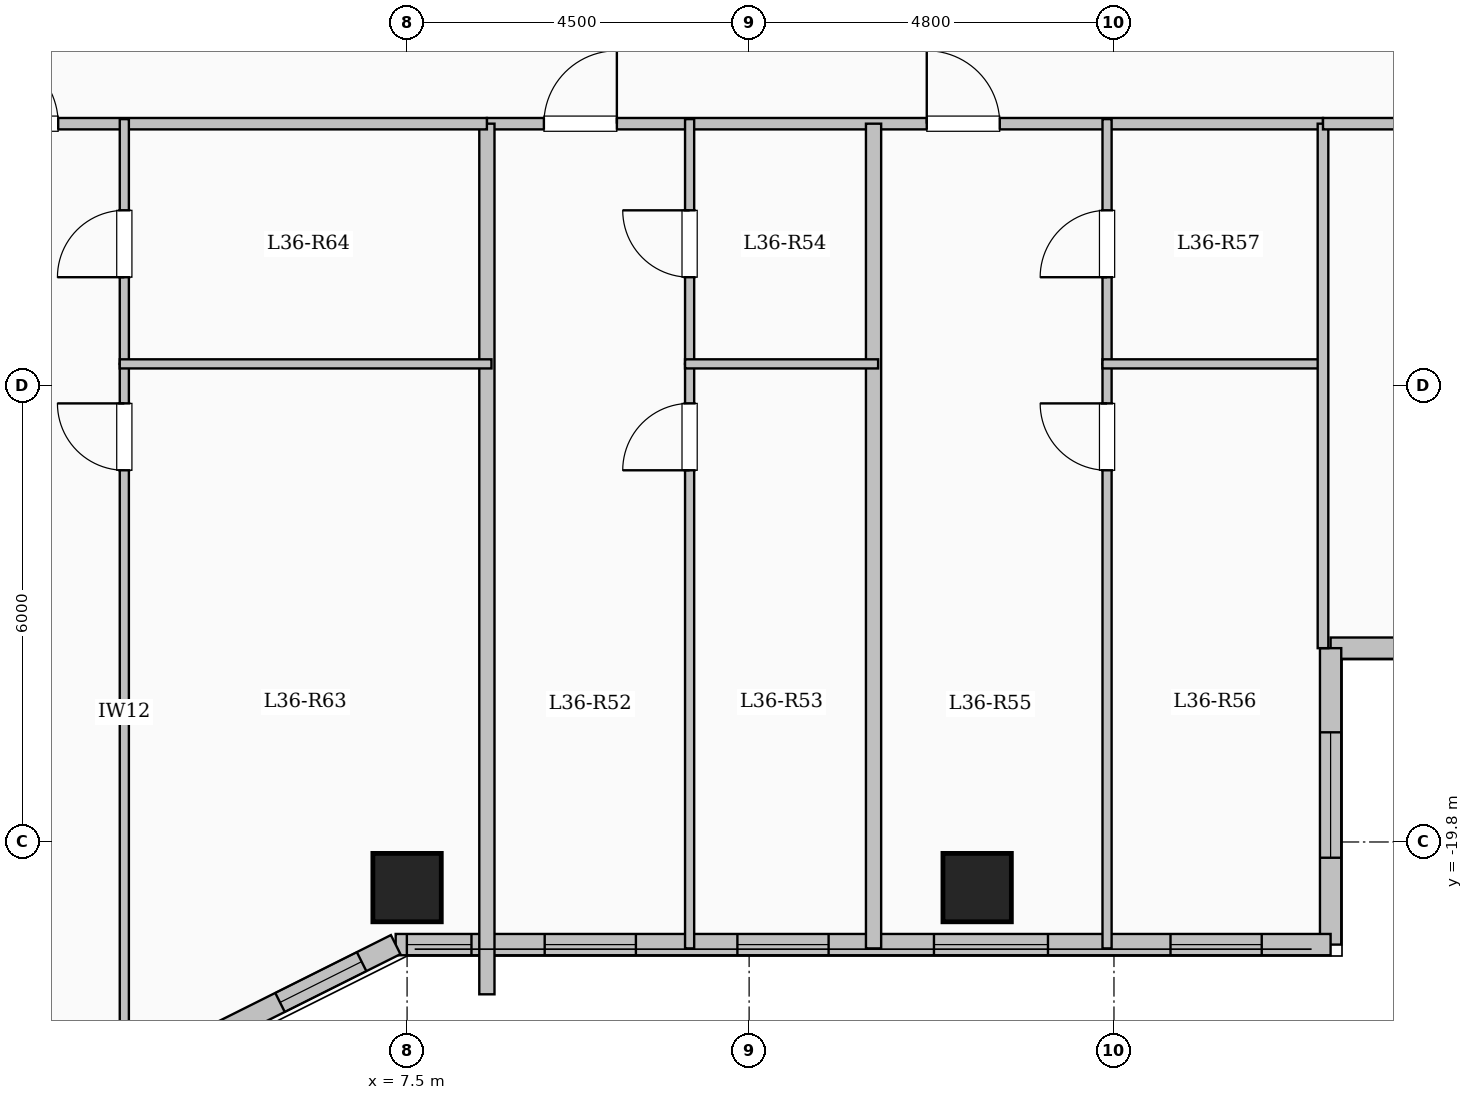
"""IFC4 building model, lengths in metres.
Left out: names, types, materials, properties, quantities, classifications, styles, units other than length and angle.
Written with IfcOpenShell. Run it as: python <this file> out.ifc"""

import sys

from ifc_helpers import new_model, si_unit, direction, frame, frame_2d, origin, origin_2d, place, context, subcontext, project, spatial, rectangle, extrude, element, fill, save


model = new_model("IFC4")
c1 = context("Model", 3, precision=1e-05, world=origin(), true_north=direction((0.0, 1.0)))
c2 = subcontext(c1, "Body", "Model", "MODEL_VIEW")
j1 = project(units=[si_unit("LENGTHUNIT", "METRE"), si_unit("PLANEANGLEUNIT", "RADIAN")], contexts=[c1])
p1 = place(None, origin())
s1 = spatial("IfcSite", under=j1, at=p1, CompositionType="ELEMENT")
p2 = place(p1, origin())
s2 = spatial("IfcBuilding", under=s1, at=p2, CompositionType="ELEMENT")
p3 = place(p2, frame((0.0, 0.0, 135.95)))
s3 = spatial("IfcBuildingStorey", under=s2, at=p3, CompositionType="ELEMENT", Elevation=135.95)
for number, where, z_axis, x_axis in (
    (1, (7.5, -20.4, 0.0), (0.0, 0.0, 1.0), (1.0, 0.0, 0.0)),
    (2, (15.0, -20.4, 0.0), (0.0, 0.0, 1.0), (1.0, 0.0, 0.0)),
):
    element("IfcColumn", number, at=place(p3, frame(where, z_axis=z_axis, x_axis=x_axis)), inside=s3, PredefinedType="COLUMN", context=c2, shape_type="SweptSolid", body=[
        extrude(rectangle(XDim=0.9, YDim=0.9, at=origin_2d()), origin(), (0.0, 0.0, 1.0), 3.35),
    ])
p4 = place(p3, frame((25.05, -17.25, 0.0), z_axis=(0.0, 0.0, 1.0), x_axis=(-1.0, 0.0, 0.0)))
e3 = element("IfcWall", 3, at=p4, inside=s3, PredefinedType="SOLIDWALL", context=c2, shape_type="SweptSolid", body=[
    extrude(rectangle(XDim=5.4, YDim=0.28, at=frame_2d((2.7, 0.0))), origin(), (0.0, 0.0, 1.0), 3.1),
])
p5 = place(p4, frame((1.625, 0.0, 0.9)))
e4 = element("IfcOpeningElement", 4, at=p5, cuts=e3, PredefinedType="OPENING", context=c2, shape_type="SweptSolid", body=[
    extrude(rectangle(XDim=2.2, YDim=1.75, at=frame_2d((1.1, 0.875))), frame((0.0, 0.15, 0.0), z_axis=(0.0, -1.0, 0.0), x_axis=(1.0, 0.0, 0.0)), (0.0, 0.0, 1.0), 0.3),
])
p6 = place(p3, frame((19.65, -17.25, 0.0), z_axis=(0.0, 0.0, 1.0), x_axis=(0.0, -1.0, 0.0)))
e5 = element("IfcWall", 5, at=p6, inside=s3, PredefinedType="SOLIDWALL", context=c2, shape_type="SweptSolid", body=[
    extrude(rectangle(XDim=3.9, YDim=0.28, at=frame_2d((1.95, 0.0))), origin(), (0.0, 0.0, 1.0), 3.1),
])
p7 = place(p6, frame((1.107, 0.0, 0.9)))
e6 = element("IfcOpeningElement", 6, at=p7, cuts=e5, PredefinedType="OPENING", context=c2, shape_type="SweptSolid", body=[
    extrude(rectangle(XDim=1.65, YDim=1.6, at=frame_2d((0.825, 0.8))), frame((0.0, 0.15, 0.0), z_axis=(0.0, -1.0, 0.0), x_axis=(1.0, 0.0, 0.0)), (0.0, 0.0, 1.0), 0.3),
])
p8 = place(p3, frame((19.65, -21.15, 0.0), z_axis=(0.0, 0.0, 1.0), x_axis=(-1.0, 0.0, 0.0)))
e7 = element("IfcWall", 7, at=p8, inside=s3, PredefinedType="SOLIDWALL", context=c2, shape_type="SweptSolid", body=[
    extrude(rectangle(XDim=12.3, YDim=0.28, at=frame_2d((6.15, 0.0))), origin(), (0.0, 0.0, 1.0), 3.1),
])
p9 = place(p8, frame((0.906, 0.0, 0.95)))
e8 = element("IfcOpeningElement", 8, at=p9, cuts=e7, PredefinedType="OPENING", context=c2, shape_type="SweptSolid", body=[
    extrude(rectangle(XDim=1.2, YDim=1.5, at=frame_2d((0.6, 0.75))), frame((0.0, 0.15, 0.0), z_axis=(0.0, -1.0, 0.0), x_axis=(1.0, 0.0, 0.0)), (0.0, 0.0, 1.0), 0.3),
])
p10 = place(p8, frame((3.718, 0.0, 0.9)))
e9 = element("IfcOpeningElement", 9, at=p10, cuts=e7, PredefinedType="OPENING", context=c2, shape_type="SweptSolid", body=[
    extrude(rectangle(XDim=1.5, YDim=1.65, at=frame_2d((0.75, 0.825))), frame((0.0, 0.15, 0.0), z_axis=(0.0, -1.0, 0.0), x_axis=(1.0, 0.0, 0.0)), (0.0, 0.0, 1.0), 0.3),
])
p11 = place(p8, frame((6.604, 0.0, 0.95)))
e10 = element("IfcOpeningElement", 10, at=p11, cuts=e7, PredefinedType="OPENING", context=c2, shape_type="SweptSolid", body=[
    extrude(rectangle(XDim=1.2, YDim=1.5, at=frame_2d((0.6, 0.75))), frame((0.0, 0.15, 0.0), z_axis=(0.0, -1.0, 0.0), x_axis=(1.0, 0.0, 0.0)), (0.0, 0.0, 1.0), 0.3),
])
p12 = place(p8, frame((9.14, 0.0, 0.95)))
e11 = element("IfcOpeningElement", 11, at=p12, cuts=e7, PredefinedType="OPENING", context=c2, shape_type="SweptSolid", body=[
    extrude(rectangle(XDim=1.2, YDim=1.5, at=frame_2d((0.6, 0.75))), frame((0.0, 0.15, 0.0), z_axis=(0.0, -1.0, 0.0), x_axis=(1.0, 0.0, 0.0)), (0.0, 0.0, 1.0), 0.3),
])
p13 = place(p8, frame((11.303, 0.0, 0.95)))
e12 = element("IfcOpeningElement", 12, at=p13, cuts=e7, PredefinedType="OPENING", context=c2, shape_type="SweptSolid", body=[
    extrude(rectangle(XDim=0.85, YDim=1.5, at=frame_2d((0.425, 0.75))), frame((0.0, 0.15, 0.0), z_axis=(0.0, -1.0, 0.0), x_axis=(1.0, 0.0, 0.0)), (0.0, 0.0, 1.0), 0.3),
])
p14 = place(p3, frame((7.35, -21.15, 0.0), z_axis=(0.0, 0.0, 1.0), x_axis=(-0.894427191, -0.4472135955, 0.0)))
e13 = element("IfcWall", 13, at=p14, inside=s3, PredefinedType="SOLIDWALL", context=c2, shape_type="SweptSolid", body=[
    extrude(rectangle(XDim=3.354, YDim=0.28, at=frame_2d((1.677, 0.0))), origin(), (0.0, 0.0, 1.0), 3.1),
])
p15 = place(p14, frame((0.501, 0.0, 0.95)))
e14 = element("IfcOpeningElement", 14, at=p15, cuts=e13, PredefinedType="OPENING", context=c2, shape_type="SweptSolid", body=[
    extrude(rectangle(XDim=1.2, YDim=1.5, at=frame_2d((0.6, 0.75))), frame((0.0, 0.15, 0.0), z_axis=(0.0, -1.0, 0.0), x_axis=(1.0, 0.0, 0.0)), (0.0, 0.0, 1.0), 0.3),
])
p16 = place(p3, frame((8.55, -10.35, 0.0), z_axis=(0.0, 0.0, 1.0), x_axis=(1.0, 0.0, 0.0)))
e15 = element("IfcWall", 15, at=p16, inside=s3, PredefinedType="PARTITIONING", context=c2, shape_type="SweptSolid", body=[
    extrude(rectangle(XDim=11.0, YDim=0.15, at=frame_2d((5.5, 0.0))), origin(), (0.0, 0.0, 1.0), 3.1),
])
p17 = place(p16, frame((0.75, 0.0, 0.0)))
e16 = element("IfcOpeningElement", 16, at=p17, cuts=e15, PredefinedType="OPENING", context=c2, shape_type="SweptSolid", body=[
    extrude(rectangle(XDim=0.96, YDim=2.15, at=frame_2d((0.48, 1.075))), frame((0.0, 0.085, 0.0), z_axis=(0.0, -1.0, 0.0), x_axis=(1.0, 0.0, 0.0)), (0.0, 0.0, 1.0), 0.17),
])
p18 = place(p16, frame((5.787, 0.0, 0.0)))
e17 = element("IfcOpeningElement", 17, at=p18, cuts=e15, PredefinedType="OPENING", context=c2, shape_type="SweptSolid", body=[
    extrude(rectangle(XDim=0.96, YDim=2.15, at=frame_2d((0.48, 1.075))), frame((0.0, 0.085, 0.0), z_axis=(0.0, -1.0, 0.0), x_axis=(1.0, 0.0, 0.0)), (0.0, 0.0, 1.0), 0.17),
])
p19 = place(p3, frame((13.637, -21.2, 0.0), z_axis=(0.0, 0.0, 1.0), x_axis=(0.0, 1.0, 0.0)))
e18 = element("IfcWall", 18, at=p19, inside=s3, PredefinedType="SOLIDWALL", context=c2, shape_type="SweptSolid", body=[
    extrude(rectangle(XDim=10.85, YDim=0.2, at=frame_2d((5.425, 0.0))), origin(), (0.0, 0.0, 1.0), 3.1),
])
p20 = place(p3, frame((11.217, -21.2, 0.0), z_axis=(0.0, 0.0, 1.0), x_axis=(0.0, 1.0, 0.0)))
e19 = element("IfcWall", 19, at=p20, inside=s3, PredefinedType="PARTITIONING", context=c2, shape_type="SweptSolid", body=[
    extrude(rectangle(XDim=7.69, YDim=0.12, at=frame_2d((3.845, 0.0))), origin(), (0.0, 0.0, 1.0), 3.1),
])
p21 = place(p20, frame((6.29, 0.0, 0.0)))
e20 = element("IfcOpeningElement", 20, at=p21, cuts=e19, PredefinedType="OPENING", context=c2, shape_type="SweptSolid", body=[
    extrude(rectangle(XDim=0.88, YDim=2.1, at=frame_2d((0.44, 1.05))), frame((0.0, 0.07, 0.0), z_axis=(0.0, -1.0, 0.0), x_axis=(1.0, 0.0, 0.0)), (0.0, 0.0, 1.0), 0.14),
])
p22 = place(p3, frame((11.217, -13.51, 0.0), z_axis=(0.0, 0.0, 1.0), x_axis=(0.0, 1.0, 0.0)))
e21 = element("IfcWall", 21, at=p22, inside=s3, PredefinedType="PARTITIONING", context=c2, shape_type="SweptSolid", body=[
    extrude(rectangle(XDim=3.22, YDim=0.12, at=frame_2d((1.61, 0.0))), origin(), (0.0, 0.0, 1.0), 3.1),
])
p23 = place(p22, frame((1.14, 0.0, 0.0)))
e22 = element("IfcOpeningElement", 22, at=p23, cuts=e21, PredefinedType="OPENING", context=c2, shape_type="SweptSolid", body=[
    extrude(rectangle(XDim=0.88, YDim=2.1, at=frame_2d((0.44, 1.05))), frame((0.0, 0.07, 0.0), z_axis=(0.0, -1.0, 0.0), x_axis=(1.0, 0.0, 0.0)), (0.0, 0.0, 1.0), 0.14),
])
p24 = place(p3, frame((11.157, -13.51, 0.0), z_axis=(0.0, 0.0, 1.0), x_axis=(1.0, 0.0, 0.0)))
e23 = element("IfcWall", 23, at=p24, inside=s3, PredefinedType="PARTITIONING", context=c2, shape_type="SweptSolid", body=[
    extrude(rectangle(XDim=2.54, YDim=0.12, at=frame_2d((1.27, 0.0))), origin(), (0.0, 0.0, 1.0), 3.1),
])
p25 = place(p3, frame((16.709, -21.2, 0.0), z_axis=(0.0, 0.0, 1.0), x_axis=(0.0, 1.0, 0.0)))
e24 = element("IfcWall", 24, at=p25, inside=s3, PredefinedType="PARTITIONING", context=c2, shape_type="SweptSolid", body=[
    extrude(rectangle(XDim=7.69, YDim=0.12, at=frame_2d((3.845, 0.0))), origin(), (0.0, 0.0, 1.0), 3.1),
])
p26 = place(p25, frame((6.29, 0.0, 0.0)))
e25 = element("IfcOpeningElement", 25, at=p26, cuts=e24, PredefinedType="OPENING", context=c2, shape_type="SweptSolid", body=[
    extrude(rectangle(XDim=0.88, YDim=2.1, at=frame_2d((0.44, 1.05))), frame((0.0, 0.07, 0.0), z_axis=(0.0, -1.0, 0.0), x_axis=(1.0, 0.0, 0.0)), (0.0, 0.0, 1.0), 0.14),
])
p27 = place(p3, frame((16.709, -13.51, 0.0), z_axis=(0.0, 0.0, 1.0), x_axis=(0.0, 1.0, 0.0)))
e26 = element("IfcWall", 26, at=p27, inside=s3, PredefinedType="PARTITIONING", context=c2, shape_type="SweptSolid", body=[
    extrude(rectangle(XDim=3.22, YDim=0.12, at=frame_2d((1.61, 0.0))), origin(), (0.0, 0.0, 1.0), 3.1),
])
p28 = place(p27, frame((1.14, 0.0, 0.0)))
e27 = element("IfcOpeningElement", 27, at=p28, cuts=e26, PredefinedType="OPENING", context=c2, shape_type="SweptSolid", body=[
    extrude(rectangle(XDim=0.88, YDim=2.1, at=frame_2d((0.44, 1.05))), frame((0.0, 0.07, 0.0), z_axis=(0.0, -1.0, 0.0), x_axis=(1.0, 0.0, 0.0)), (0.0, 0.0, 1.0), 0.14),
])
p29 = place(p3, frame((16.649, -13.51, 0.0), z_axis=(0.0, 0.0, 1.0), x_axis=(1.0, 0.0, 0.0)))
e28 = element("IfcWall", 28, at=p29, inside=s3, PredefinedType="PARTITIONING", context=c2, shape_type="SweptSolid", body=[
    extrude(rectangle(XDim=2.961, YDim=0.12, at=frame_2d((1.48, 0.0))), origin(), (0.0, 0.0, 1.0), 3.1),
])
p30 = place(p3, frame((8.55, -21.804, 0.0), z_axis=(0.0, 0.0, 1.0), x_axis=(0.0, 1.0, 0.0)))
e29 = element("IfcWall", 29, at=p30, inside=s3, PredefinedType="SOLIDWALL", context=c2, shape_type="SweptSolid", body=[
    extrude(rectangle(XDim=11.454, YDim=0.2, at=frame_2d((5.727, 0.0))), origin(), (0.0, 0.0, 1.0), 3.1),
])
p31 = place(p3, frame((-8.55, -10.35, 0.0), z_axis=(0.0, 0.0, 1.0), x_axis=(1.0, 0.0, 0.0)))
e30 = element("IfcWall", 30, at=p31, inside=s3, PredefinedType="PARTITIONING", context=c2, shape_type="SweptSolid", body=[
    extrude(rectangle(XDim=17.1, YDim=0.15, at=frame_2d((8.55, 0.0))), origin(), (0.0, 0.0, 1.0), 3.1),
])
p32 = place(p31, frame((1.15, 0.0, 0.0)))
e31 = element("IfcOpeningElement", 31, at=p32, cuts=e30, PredefinedType="OPENING", context=c2, shape_type="SweptSolid", body=[
    extrude(rectangle(XDim=0.96, YDim=2.15, at=frame_2d((0.48, 1.075))), frame((0.0, 0.085, 0.0), z_axis=(0.0, -1.0, 0.0), x_axis=(1.0, 0.0, 0.0)), (0.0, 0.0, 1.0), 0.17),
])
p33 = place(p31, frame((10.5, 0.0, 0.0)))
e32 = element("IfcOpeningElement", 32, at=p33, cuts=e30, PredefinedType="OPENING", context=c2, shape_type="SweptSolid", body=[
    extrude(rectangle(XDim=0.96, YDim=2.15, at=frame_2d((0.48, 1.075))), frame((0.0, 0.085, 0.0), z_axis=(0.0, -1.0, 0.0), x_axis=(1.0, 0.0, 0.0)), (0.0, 0.0, 1.0), 0.17),
])
p34 = place(p3, frame((3.78, -22.68, 0.0), z_axis=(0.0, 0.0, 1.0), x_axis=(0.0, 1.0, 0.0)))
e33 = element("IfcWall", 33, at=p34, inside=s3, PredefinedType="PARTITIONING", context=c2, shape_type="SweptSolid", body=[
    extrude(rectangle(XDim=9.17, YDim=0.12, at=frame_2d((4.585, 0.0))), origin(), (0.0, 0.0, 1.0), 3.1),
])
p35 = place(p34, frame((7.77, 0.0, 0.0)))
e34 = element("IfcOpeningElement", 34, at=p35, cuts=e33, PredefinedType="OPENING", context=c2, shape_type="SweptSolid", body=[
    extrude(rectangle(XDim=0.88, YDim=2.1, at=frame_2d((0.44, 1.05))), frame((0.0, 0.07, 0.0), z_axis=(0.0, -1.0, 0.0), x_axis=(1.0, 0.0, 0.0)), (0.0, 0.0, 1.0), 0.14),
])
p36 = place(p3, frame((3.78, -13.51, 0.0), z_axis=(0.0, 0.0, 1.0), x_axis=(0.0, 1.0, 0.0)))
e35 = element("IfcWall", 35, at=p36, inside=s3, PredefinedType="PARTITIONING", context=c2, shape_type="SweptSolid", body=[
    extrude(rectangle(XDim=3.22, YDim=0.12, at=frame_2d((1.61, 0.0))), origin(), (0.0, 0.0, 1.0), 3.1),
])
p37 = place(p36, frame((1.14, 0.0, 0.0)))
e36 = element("IfcOpeningElement", 36, at=p37, cuts=e35, PredefinedType="OPENING", context=c2, shape_type="SweptSolid", body=[
    extrude(rectangle(XDim=0.88, YDim=2.1, at=frame_2d((0.44, 1.05))), frame((0.0, 0.07, 0.0), z_axis=(0.0, -1.0, 0.0), x_axis=(1.0, 0.0, 0.0)), (0.0, 0.0, 1.0), 0.14),
])
p38 = place(p3, frame((3.72, -13.51, 0.0), z_axis=(0.0, 0.0, 1.0), x_axis=(1.0, 0.0, 0.0)))
e37 = element("IfcWall", 37, at=p38, inside=s3, PredefinedType="PARTITIONING", context=c2, shape_type="SweptSolid", body=[
    extrude(rectangle(XDim=4.89, YDim=0.12, at=frame_2d((2.445, 0.0))), origin(), (0.0, 0.0, 1.0), 3.1),
])
p39 = place(p3, frame((19.55, -17.25, 0.0), z_axis=(0.0, 0.0, 1.0), x_axis=(0.0, 1.0, 0.0)))
e38 = element("IfcWall", 38, at=p39, inside=s3, PredefinedType="PARTITIONING", context=c2, shape_type="SweptSolid", body=[
    extrude(rectangle(XDim=6.9, YDim=0.14, at=frame_2d((3.45, 0.0))), origin(), (0.0, 0.0, 1.0), 3.1),
])
p40 = place(p3, frame((19.55, -10.35, 0.0), z_axis=(0.0, 0.0, 1.0), x_axis=(1.0, 0.0, 0.0)))
e39 = element("IfcWall", 39, at=p40, inside=s3, PredefinedType="PARTITIONING", context=c2, shape_type="SweptSolid", body=[
    extrude(rectangle(XDim=5.53, YDim=0.15, at=frame_2d((2.765, 0.0))), origin(), (0.0, 0.0, 1.0), 3.1),
])
p41 = place(p40, frame((2.29, 0.0, 0.0)))
e40 = element("IfcOpeningElement", 40, at=p41, cuts=e39, PredefinedType="OPENING", context=c2, shape_type="SweptSolid", body=[
    extrude(rectangle(XDim=0.95, YDim=2.15, at=frame_2d((0.475, 1.075))), frame((0.0, 0.085, 0.0), z_axis=(0.0, -1.0, 0.0), x_axis=(1.0, 0.0, 0.0)), (0.0, 0.0, 1.0), 0.17),
])
p42 = place(p7, origin())
e41 = element("IfcWindow", 41, at=p42, inside=s3, PartitioningType="SINGLE_PANEL", PredefinedType="WINDOW", context=c2, shape_type="SweptSolid", body=[
    extrude(rectangle(XDim=1.65, YDim=1.6, at=frame_2d((0.825, 0.8))), frame((0.0, 0.03, 0.0), z_axis=(0.0, -1.0, 0.0), x_axis=(1.0, 0.0, 0.0)), (0.0, 0.0, 1.0), 0.06),
])
fill(e6, e41)
p43 = place(p9, origin())
e42 = element("IfcWindow", 42, at=p43, inside=s3, PartitioningType="SINGLE_PANEL", PredefinedType="WINDOW", context=c2, shape_type="SweptSolid", body=[
    extrude(rectangle(XDim=1.2, YDim=1.5, at=frame_2d((0.6, 0.75))), frame((0.0, 0.03, 0.0), z_axis=(0.0, -1.0, 0.0), x_axis=(1.0, 0.0, 0.0)), (0.0, 0.0, 1.0), 0.06),
])
fill(e8, e42)
p44 = place(p10, origin())
e43 = element("IfcWindow", 43, at=p44, inside=s3, PartitioningType="SINGLE_PANEL", PredefinedType="WINDOW", context=c2, shape_type="SweptSolid", body=[
    extrude(rectangle(XDim=1.5, YDim=1.65, at=frame_2d((0.75, 0.825))), frame((0.0, 0.03, 0.0), z_axis=(0.0, -1.0, 0.0), x_axis=(1.0, 0.0, 0.0)), (0.0, 0.0, 1.0), 0.06),
])
fill(e9, e43)
p45 = place(p11, origin())
e44 = element("IfcWindow", 44, at=p45, inside=s3, PartitioningType="SINGLE_PANEL", PredefinedType="WINDOW", context=c2, shape_type="SweptSolid", body=[
    extrude(rectangle(XDim=1.2, YDim=1.5, at=frame_2d((0.6, 0.75))), frame((0.0, 0.03, 0.0), z_axis=(0.0, -1.0, 0.0), x_axis=(1.0, 0.0, 0.0)), (0.0, 0.0, 1.0), 0.06),
])
fill(e10, e44)
p46 = place(p12, origin())
e45 = element("IfcWindow", 45, at=p46, inside=s3, PartitioningType="SINGLE_PANEL", PredefinedType="WINDOW", context=c2, shape_type="SweptSolid", body=[
    extrude(rectangle(XDim=1.2, YDim=1.5, at=frame_2d((0.6, 0.75))), frame((0.0, 0.03, 0.0), z_axis=(0.0, -1.0, 0.0), x_axis=(1.0, 0.0, 0.0)), (0.0, 0.0, 1.0), 0.06),
])
fill(e11, e45)
p47 = place(p13, origin())
e46 = element("IfcWindow", 46, at=p47, inside=s3, PartitioningType="SINGLE_PANEL", PredefinedType="WINDOW", context=c2, shape_type="SweptSolid", body=[
    extrude(rectangle(XDim=0.85, YDim=1.5, at=frame_2d((0.425, 0.75))), frame((0.0, 0.03, 0.0), z_axis=(0.0, -1.0, 0.0), x_axis=(1.0, 0.0, 0.0)), (0.0, 0.0, 1.0), 0.06),
])
fill(e12, e46)
p48 = place(p15, origin())
e47 = element("IfcWindow", 47, at=p48, inside=s3, PartitioningType="SINGLE_PANEL", PredefinedType="WINDOW", context=c2, shape_type="SweptSolid", body=[
    extrude(rectangle(XDim=1.2, YDim=1.5, at=frame_2d((0.6, 0.75))), frame((0.0, 0.03, 0.0), z_axis=(0.0, -1.0, 0.0), x_axis=(1.0, 0.0, 0.0)), (0.0, 0.0, 1.0), 0.06),
])
fill(e14, e47)
p49 = place(p17, origin())
e48 = element("IfcDoor", 48, at=p49, inside=s3, OperationType="SINGLE_SWING_RIGHT", PredefinedType="DOOR", context=c2, shape_type="SweptSolid", body=[
    extrude(rectangle(XDim=0.96, YDim=2.15, at=frame_2d((0.48, 1.075))), frame((0.0, 0.025, 0.0), z_axis=(0.0, -1.0, 0.0), x_axis=(1.0, 0.0, 0.0)), (0.0, 0.0, 1.0), 0.05),
])
fill(e16, e48)
p50 = place(p21, origin())
e49 = element("IfcDoor", 49, at=p50, inside=s3, OperationType="SINGLE_SWING_LEFT", PredefinedType="DOOR", context=c2, shape_type="SweptSolid", body=[
    extrude(rectangle(XDim=0.88, YDim=2.1, at=frame_2d((0.44, 1.05))), frame((0.0, 0.025, 0.0), z_axis=(0.0, -1.0, 0.0), x_axis=(1.0, 0.0, 0.0)), (0.0, 0.0, 1.0), 0.05),
])
fill(e20, e49)
p51 = place(p23, origin())
e50 = element("IfcDoor", 50, at=p51, inside=s3, OperationType="SINGLE_SWING_RIGHT", PredefinedType="DOOR", context=c2, shape_type="SweptSolid", body=[
    extrude(rectangle(XDim=0.88, YDim=2.1, at=frame_2d((0.44, 1.05))), frame((0.0, 0.025, 0.0), z_axis=(0.0, -1.0, 0.0), x_axis=(1.0, 0.0, 0.0)), (0.0, 0.0, 1.0), 0.05),
])
fill(e22, e50)
p52 = place(p18, origin())
e51 = element("IfcDoor", 51, at=p52, inside=s3, OperationType="SINGLE_SWING_LEFT", PredefinedType="DOOR", context=c2, shape_type="SweptSolid", body=[
    extrude(rectangle(XDim=0.96, YDim=2.15, at=frame_2d((0.48, 1.075))), frame((0.0, 0.025, 0.0), z_axis=(0.0, -1.0, 0.0), x_axis=(1.0, 0.0, 0.0)), (0.0, 0.0, 1.0), 0.05),
])
fill(e17, e51)
p53 = place(p26, origin())
e52 = element("IfcDoor", 52, at=p53, inside=s3, OperationType="SINGLE_SWING_RIGHT", PredefinedType="DOOR", context=c2, shape_type="SweptSolid", body=[
    extrude(rectangle(XDim=0.88, YDim=2.1, at=frame_2d((0.44, 1.05))), frame((0.0, 0.025, 0.0), z_axis=(0.0, -1.0, 0.0), x_axis=(1.0, 0.0, 0.0)), (0.0, 0.0, 1.0), 0.05),
])
fill(e25, e52)
p54 = place(p28, origin())
e53 = element("IfcDoor", 53, at=p54, inside=s3, OperationType="SINGLE_SWING_LEFT", PredefinedType="DOOR", context=c2, shape_type="SweptSolid", body=[
    extrude(rectangle(XDim=0.88, YDim=2.1, at=frame_2d((0.44, 1.05))), frame((0.0, 0.025, 0.0), z_axis=(0.0, -1.0, 0.0), x_axis=(1.0, 0.0, 0.0)), (0.0, 0.0, 1.0), 0.05),
])
fill(e27, e53)
p55 = place(p33, origin())
e54 = element("IfcDoor", 54, at=p55, inside=s3, OperationType="SINGLE_SWING_LEFT", PredefinedType="DOOR", context=c2, shape_type="SweptSolid", body=[
    extrude(rectangle(XDim=0.96, YDim=2.15, at=frame_2d((0.48, 1.075))), frame((0.0, 0.025, 0.0), z_axis=(0.0, -1.0, 0.0), x_axis=(1.0, 0.0, 0.0)), (0.0, 0.0, 1.0), 0.05),
])
fill(e32, e54)
p56 = place(p35, origin())
e55 = element("IfcDoor", 55, at=p56, inside=s3, OperationType="SINGLE_SWING_RIGHT", PredefinedType="DOOR", context=c2, shape_type="SweptSolid", body=[
    extrude(rectangle(XDim=0.88, YDim=2.1, at=frame_2d((0.44, 1.05))), frame((0.0, 0.025, 0.0), z_axis=(0.0, -1.0, 0.0), x_axis=(1.0, 0.0, 0.0)), (0.0, 0.0, 1.0), 0.05),
])
fill(e34, e55)
p57 = place(p37, origin())
e56 = element("IfcDoor", 56, at=p57, inside=s3, OperationType="SINGLE_SWING_LEFT", PredefinedType="DOOR", context=c2, shape_type="SweptSolid", body=[
    extrude(rectangle(XDim=0.88, YDim=2.1, at=frame_2d((0.44, 1.05))), frame((0.0, 0.025, 0.0), z_axis=(0.0, -1.0, 0.0), x_axis=(1.0, 0.0, 0.0)), (0.0, 0.0, 1.0), 0.05),
])
fill(e36, e56)
save(model, sys.argv[1])
